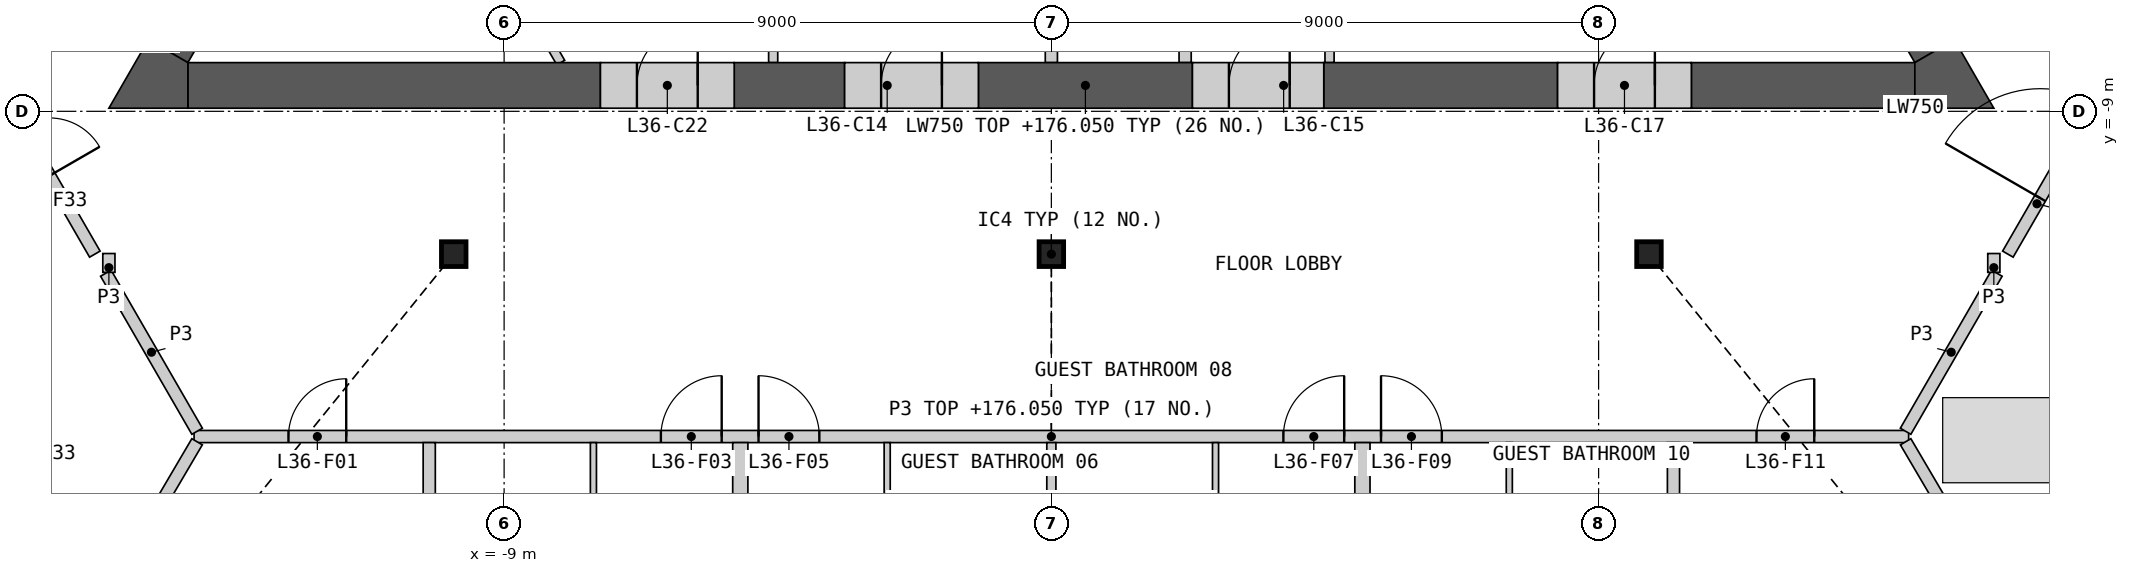
"""IFC4 building model, lengths in metres.
Left out: names, types, materials, properties, quantities, classifications, styles, units other than length and angle.
Written with IfcOpenShell. Run it as: python <this file> out.ifc"""

import sys

from ifc_helpers import new_model, si_unit, direction, frame, frame_2d, origin, origin_2d, place, context, subcontext, project, spatial, polyline, rectangle, i_section, outline, extrude, element, fill, save


model = new_model("IFC4")
c1 = context("Model", 3, precision=1e-05, world=origin(), true_north=direction((0.0, 1.0)))
c2 = subcontext(c1, "Body", "Model", "MODEL_VIEW")
j1 = project(units=[si_unit("LENGTHUNIT", "METRE"), si_unit("PLANEANGLEUNIT", "RADIAN")], contexts=[c1])
p1 = place(None, origin())
s1 = spatial("IfcSite", under=j1, at=p1, CompositionType="ELEMENT")
p2 = place(p1, origin())
s2 = spatial("IfcBuilding", under=s1, at=p2, CompositionType="ELEMENT")
p3 = place(p2, frame((0.0, 0.0, 172.8)))
s3 = spatial("IfcBuildingStorey", under=s2, at=p3, CompositionType="ELEMENT", Elevation=172.8)
for number, where, z_axis, x_axis in (
    (1, (-9.828, -11.349, 0.0), (0.0, 0.0, 1.0), (1.0, 0.0, 0.0)),
    (2, (0.0, -11.349, 0.0), (0.0, 0.0, 1.0), (1.0, 0.0, 0.0)),
    (3, (9.828, -11.349, 0.0), (0.0, 0.0, 1.0), (1.0, 0.0, 0.0)),
):
    element("IfcColumn", number, at=place(p3, frame(where, z_axis=z_axis, x_axis=x_axis)), inside=s3, PredefinedType="COLUMN", context=c2, shape_type="SweptSolid", body=[
        extrude(i_section(OverallWidth=0.404, OverallDepth=0.407, WebThickness=0.027, FlangeThickness=0.044, at=origin_2d()), origin(), (0.0, 0.0, 1.0), 3.6),
    ])
for number, where, z_axis, x_axis in (
    (4, (0.0, -6.906, 0.0), (0.0, 0.0, 1.0), (0.0, -1.0, 0.0)),
    (5, (2.2, -6.906, 0.0), (0.0, 0.0, 1.0), (0.0, -1.0, 0.0)),
):
    element("IfcWall", number, at=place(p3, frame(where, z_axis=z_axis, x_axis=x_axis)), inside=s3, PredefinedType="SHEAR", context=c2, shape_type="SweptSolid", body=[
        extrude(rectangle(XDim=1.293, YDim=0.2, at=frame_2d((0.646, 0.0))), origin(), (0.0, 0.0, 1.0), 3.25),
    ])
for number, where, z_axis, x_axis in (
    (6, (4.575, -6.906, 0.0), (0.0, 0.0, 1.0), (0.0, -1.0, 0.0)),
    (7, (-4.575, -6.906, 0.0), (0.0, 0.0, 1.0), (0.0, -1.0, 0.0)),
):
    element("IfcWall", number, at=place(p3, frame(where, z_axis=z_axis, x_axis=x_axis)), inside=s3, PredefinedType="PARTITIONING", context=c2, shape_type="SweptSolid", body=[
        extrude(rectangle(XDim=1.293, YDim=0.15, at=frame_2d((0.646, 0.0))), origin(), (0.0, 0.0, 1.0), 3.25),
    ])
p4 = place(p3, frame((-8.83, -6.881, 0.0), z_axis=(0.0, 0.0, 1.0), x_axis=(0.500037110984, -0.866003976688, 0.0)))
e8 = element("IfcWall", 8, at=p4, inside=s3, PredefinedType="PARTITIONING", context=c2, shape_type="SweptSolid", body=[
    extrude(rectangle(XDim=1.522, YDim=0.15, at=frame_2d((0.761, 0.0))), origin(), (0.0, 0.0, 1.0), 3.25),
])
p5 = place(p3, frame((-14.201, -8.574, 0.0), z_axis=(0.0, 0.0, 1.0), x_axis=(1.0, 0.0, 0.0)))
e9 = element("IfcWall", 9, at=p5, inside=s3, PredefinedType="SHEAR", context=c2, shape_type="SweptSolid", body=[
    extrude(rectangle(XDim=6.785, YDim=0.75, at=frame_2d((3.393, 0.0))), origin(), (0.0, 0.0, 1.0), 3.25),
])
p6 = place(p3, frame((4.48, -8.574, 0.0), z_axis=(0.0, 0.0, 1.0), x_axis=(1.0, 0.0, 0.0)))
e10 = element("IfcWall", 10, at=p6, inside=s3, PredefinedType="SHEAR", context=c2, shape_type="SweptSolid", body=[
    extrude(rectangle(XDim=3.845, YDim=0.75, at=frame_2d((1.923, 0.0))), origin(), (0.0, 0.0, 1.0), 3.25),
])
p7 = place(p3, frame((10.525, -8.574, 0.0), z_axis=(0.0, 0.0, 1.0), x_axis=(1.0, 0.0, 0.0)))
e11 = element("IfcWall", 11, at=p7, inside=s3, PredefinedType="SHEAR", context=c2, shape_type="SweptSolid", body=[
    extrude(rectangle(XDim=3.676, YDim=0.75, at=frame_2d((1.838, 0.0))), origin(), (0.0, 0.0, 1.0), 3.25),
])
p8 = place(p3, frame((-1.2, -8.574, 0.0), z_axis=(0.0, 0.0, 1.0), x_axis=(1.0, 0.0, 0.0)))
e12 = element("IfcWall", 12, at=p8, inside=s3, PredefinedType="SHEAR", context=c2, shape_type="SweptSolid", body=[
    extrude(rectangle(XDim=3.52, YDim=0.75, at=frame_2d((1.76, 0.0))), origin(), (0.0, 0.0, 1.0), 3.25),
])
p9 = place(p3, frame((-5.216, -8.574, 0.0), z_axis=(0.0, 0.0, 1.0), x_axis=(1.0, 0.0, 0.0)))
e13 = element("IfcWall", 13, at=p9, inside=s3, PredefinedType="SHEAR", context=c2, shape_type="SweptSolid", body=[
    extrude(rectangle(XDim=1.816, YDim=0.75, at=frame_2d((0.908, 0.0))), origin(), (0.0, 0.0, 1.0), 3.25),
])
p10 = place(p3, frame((14.526, -8.011, 0.0), z_axis=(0.0, 0.0, 1.0), x_axis=(-0.499994855372, 0.866028374016, 0.0)))
e14 = element("IfcWall", 14, at=p10, inside=s3, PredefinedType="SHEAR", context=c2, shape_type="SweptSolid", body=[
    extrude(rectangle(XDim=14.301, YDim=0.75, at=frame_2d((7.15, 0.0))), origin(), (0.0, 0.0, 1.0), 3.25),
])
p11 = place(p3, frame((-13.564, -6.346, 0.0), z_axis=(0.0, 0.0, 1.0), x_axis=(-0.499989888488, -0.86603124159, 0.0)))
e15 = element("IfcWall", 15, at=p11, inside=s3, PredefinedType="SHEAR", context=c2, shape_type="SweptSolid", body=[
    extrude(rectangle(XDim=1.923, YDim=0.75, at=frame_2d((0.961, 0.0))), origin(), (0.0, 0.0, 1.0), 3.25),
])
p12 = place(p3, origin())
e16 = element("IfcWall", 16, at=p12, inside=s3, PredefinedType="SHEAR", context=c2, shape_type="SweptSolid", body=[
    extrude(outline(polyline([(14.201, -8.949), (14.201, -8.199), (14.851, -7.824), (15.5, -8.949), (14.201, -8.949)])), origin(), (0.0, 0.0, 1.0), 3.25),
])
p13 = place(p3, origin())
e17 = element("IfcWall", 17, at=p13, inside=s3, PredefinedType="SHEAR", context=c2, shape_type="SweptSolid", body=[
    extrude(outline(polyline([(-14.851, -7.824), (-14.201, -8.199), (-14.201, -8.949), (-15.5, -8.949), (-14.851, -7.824)])), origin(), (0.0, 0.0, 1.0), 3.25),
])
p14 = place(p3, frame((-3.4, -8.574, 0.0), z_axis=(0.0, 0.0, 1.0), x_axis=(1.0, 0.0, 0.0)))
e18 = element("IfcWall", 18, at=p14, inside=s3, PredefinedType="SHEAR", context=c2, shape_type="SweptSolid", body=[
    extrude(rectangle(XDim=2.2, YDim=0.75, at=frame_2d((1.1, 0.0))), origin(), (0.0, 0.0, 1.0), 3.25),
])
p15 = place(p14, frame((0.6, 0.0, 0.0)))
e19 = element("IfcOpeningElement", 19, at=p15, cuts=e18, PredefinedType="OPENING", context=c2, shape_type="SweptSolid", body=[
    extrude(rectangle(XDim=1.0, YDim=2.1, at=frame_2d((0.5, 1.05))), frame((0.0, 0.385, 0.0), z_axis=(0.0, -1.0, 0.0), x_axis=(1.0, 0.0, 0.0)), (0.0, 0.0, 1.0), 0.77),
])
p16 = place(p3, frame((2.32, -8.574, 0.0), z_axis=(0.0, 0.0, 1.0), x_axis=(1.0, 0.0, 0.0)))
e20 = element("IfcWall", 20, at=p16, inside=s3, PredefinedType="SHEAR", context=c2, shape_type="SweptSolid", body=[
    extrude(rectangle(XDim=2.16, YDim=0.75, at=frame_2d((1.08, 0.0))), origin(), (0.0, 0.0, 1.0), 3.25),
])
p17 = place(p16, frame((0.6, 0.0, 0.0)))
e21 = element("IfcOpeningElement", 21, at=p17, cuts=e20, PredefinedType="OPENING", context=c2, shape_type="SweptSolid", body=[
    extrude(rectangle(XDim=1.0, YDim=2.1, at=frame_2d((0.5, 1.05))), frame((0.0, 0.385, 0.0), z_axis=(0.0, -1.0, 0.0), x_axis=(1.0, 0.0, 0.0)), (0.0, 0.0, 1.0), 0.77),
])
p18 = place(p3, frame((8.325, -8.574, 0.0), z_axis=(0.0, 0.0, 1.0), x_axis=(1.0, 0.0, 0.0)))
e22 = element("IfcWall", 22, at=p18, inside=s3, PredefinedType="SHEAR", context=c2, shape_type="SweptSolid", body=[
    extrude(rectangle(XDim=2.2, YDim=0.75, at=frame_2d((1.1, 0.0))), origin(), (0.0, 0.0, 1.0), 3.25),
])
p19 = place(p18, frame((0.6, 0.0, 0.0)))
e23 = element("IfcOpeningElement", 23, at=p19, cuts=e22, PredefinedType="OPENING", context=c2, shape_type="SweptSolid", body=[
    extrude(rectangle(XDim=1.0, YDim=2.1, at=frame_2d((0.5, 1.05))), frame((0.0, 0.385, 0.0), z_axis=(0.0, -1.0, 0.0), x_axis=(1.0, 0.0, 0.0)), (0.0, 0.0, 1.0), 0.77),
])
p20 = place(p3, frame((-7.416, -8.574, 0.0), z_axis=(0.0, 0.0, 1.0), x_axis=(1.0, 0.0, 0.0)))
e24 = element("IfcWall", 24, at=p20, inside=s3, PredefinedType="SHEAR", context=c2, shape_type="SweptSolid", body=[
    extrude(rectangle(XDim=2.2, YDim=0.75, at=frame_2d((1.1, 0.0))), origin(), (0.0, 0.0, 1.0), 3.25),
])
p21 = place(p20, frame((0.6, 0.0, 0.0)))
e25 = element("IfcOpeningElement", 25, at=p21, cuts=e24, PredefinedType="OPENING", context=c2, shape_type="SweptSolid", body=[
    extrude(rectangle(XDim=1.0, YDim=2.1, at=frame_2d((0.5, 1.05))), frame((0.0, 0.385, 0.0), z_axis=(0.0, -1.0, 0.0), x_axis=(1.0, 0.0, 0.0)), (0.0, 0.0, 1.0), 0.77),
])
p22 = place(p3, frame((-14.099, -14.349, 0.0), z_axis=(0.0, 0.0, 1.0), x_axis=(1.0, 0.0, 0.0)))
e26 = element("IfcWall", 26, at=p22, inside=s3, PredefinedType="PARTITIONING", context=c2, shape_type="SweptSolid", body=[
    extrude(rectangle(XDim=28.198, YDim=0.2, at=frame_2d((14.099, 0.0))), origin(), (0.0, 0.0, 1.0), 3.25),
])
p23 = place(p22, frame((1.552, 0.0, 0.0)))
e27 = element("IfcOpeningElement", 27, at=p23, cuts=e26, PredefinedType="OPENING", context=c2, shape_type="SweptSolid", body=[
    extrude(rectangle(XDim=0.95, YDim=2.1, at=frame_2d((0.475, 1.05))), frame((0.0, 0.11, 0.0), z_axis=(0.0, -1.0, 0.0), x_axis=(1.0, 0.0, 0.0)), (0.0, 0.0, 1.0), 0.22),
])
p24 = place(p22, frame((7.677, 0.0, 0.0)))
e28 = element("IfcOpeningElement", 28, at=p24, cuts=e26, PredefinedType="OPENING", context=c2, shape_type="SweptSolid", body=[
    extrude(rectangle(XDim=1.0, YDim=2.1, at=frame_2d((0.5, 1.05))), frame((0.0, 0.11, 0.0), z_axis=(0.0, -1.0, 0.0), x_axis=(1.0, 0.0, 0.0)), (0.0, 0.0, 1.0), 0.22),
])
p25 = place(p22, frame((9.283, 0.0, 0.0)))
e29 = element("IfcOpeningElement", 29, at=p25, cuts=e26, PredefinedType="OPENING", context=c2, shape_type="SweptSolid", body=[
    extrude(rectangle(XDim=1.0, YDim=2.1, at=frame_2d((0.5, 1.05))), frame((0.0, 0.11, 0.0), z_axis=(0.0, -1.0, 0.0), x_axis=(1.0, 0.0, 0.0)), (0.0, 0.0, 1.0), 0.22),
])
p26 = place(p22, frame((17.915, 0.0, 0.0)))
e30 = element("IfcOpeningElement", 30, at=p26, cuts=e26, PredefinedType="OPENING", context=c2, shape_type="SweptSolid", body=[
    extrude(rectangle(XDim=1.0, YDim=2.1, at=frame_2d((0.5, 1.05))), frame((0.0, 0.11, 0.0), z_axis=(0.0, -1.0, 0.0), x_axis=(1.0, 0.0, 0.0)), (0.0, 0.0, 1.0), 0.22),
])
p27 = place(p22, frame((19.521, 0.0, 0.0)))
e31 = element("IfcOpeningElement", 31, at=p27, cuts=e26, PredefinedType="OPENING", context=c2, shape_type="SweptSolid", body=[
    extrude(rectangle(XDim=1.0, YDim=2.1, at=frame_2d((0.5, 1.05))), frame((0.0, 0.11, 0.0), z_axis=(0.0, -1.0, 0.0), x_axis=(1.0, 0.0, 0.0)), (0.0, 0.0, 1.0), 0.22),
])
p28 = place(p22, frame((25.696, 0.0, 0.0)))
e32 = element("IfcOpeningElement", 32, at=p28, cuts=e26, PredefinedType="OPENING", context=c2, shape_type="SweptSolid", body=[
    extrude(rectangle(XDim=0.95, YDim=2.1, at=frame_2d((0.475, 1.05))), frame((0.0, 0.11, 0.0), z_axis=(0.0, -1.0, 0.0), x_axis=(1.0, 0.0, 0.0)), (0.0, 0.0, 1.0), 0.22),
])
p29 = place(p3, frame((-17.744, -8.035, 0.0), z_axis=(0.0, 0.0, 1.0), x_axis=(0.500007607708, 0.866021011428, 0.0)))
e33 = element("IfcWall", 33, at=p29, inside=s3, PredefinedType="PARTITIONING", context=c2, shape_type="SweptSolid", body=[
    extrude(rectangle(XDim=5.484, YDim=0.2, at=frame_2d((2.742, 0.0))), origin(), (0.0, 0.0, 1.0), 3.25),
])
p30 = place(p29, frame((0.352, 0.0, 0.0)))
e34 = element("IfcOpeningElement", 34, at=p30, cuts=e33, PredefinedType="OPENING", context=c2, shape_type="SweptSolid", body=[
    extrude(rectangle(XDim=1.1, YDim=2.1, at=frame_2d((0.55, 1.05))), frame((0.0, 0.11, 0.0), z_axis=(0.0, -1.0, 0.0), x_axis=(1.0, 0.0, 0.0)), (0.0, 0.0, 1.0), 0.22),
])
p31 = place(p3, frame((15.002, -3.286, 0.0), z_axis=(0.0, 0.0, 1.0), x_axis=(0.500007607708, -0.866021011428, 0.0)))
e35 = element("IfcWall", 35, at=p31, inside=s3, PredefinedType="PARTITIONING", context=c2, shape_type="SweptSolid", body=[
    extrude(rectangle(XDim=5.484, YDim=0.2, at=frame_2d((2.742, 0.0))), origin(), (0.0, 0.0, 1.0), 3.25),
])
p32 = place(p31, frame((4.032, 0.0, 0.0)))
e36 = element("IfcOpeningElement", 36, at=p32, cuts=e35, PredefinedType="OPENING", context=c2, shape_type="SweptSolid", body=[
    extrude(rectangle(XDim=1.1, YDim=2.1, at=frame_2d((0.55, 1.05))), frame((0.0, 0.11, 0.0), z_axis=(0.0, -1.0, 0.0), x_axis=(1.0, 0.0, 0.0)), (0.0, 0.0, 1.0), 0.22),
])
for number, where, z_axis, x_axis in (
    (37, (-5.116, -19.661, 0.0), (0.0, 0.0, 1.0), (0.0, 1.0, 0.0)),
    (38, (5.116, -19.661, 0.0), (0.0, 0.0, 1.0), (0.0, 1.0, 0.0)),
):
    element("IfcWall", number, at=place(p3, frame(where, z_axis=z_axis, x_axis=x_axis)), inside=s3, PredefinedType="PARTITIONING", context=c2, shape_type="SweptSolid", body=[
        extrude(rectangle(XDim=5.212, YDim=0.25, at=frame_2d((2.606, 0.0))), origin(), (0.0, 0.0, 1.0), 2.404),
    ])
p33 = place(p3, frame((15.731, -11.349, 0.0), z_axis=(0.0, 0.0, 1.0), x_axis=(0.499961815444, 0.866047448526, 0.0)))
e39 = element("IfcWall", 39, at=p33, inside=s3, PredefinedType="PARTITIONING", context=c2, shape_type="SweptSolid", body=[
    extrude(rectangle(XDim=3.826, YDim=0.2, at=frame_2d((1.913, 0.0))), origin(), (0.0, 0.0, 1.0), 3.25),
])
p34 = place(p33, frame((1.064, 0.0, 0.0)))
e40 = element("IfcOpeningElement", 40, at=p34, cuts=e39, PredefinedType="OPENING", context=c2, shape_type="SweptSolid", body=[
    extrude(rectangle(XDim=1.8, YDim=2.1, at=frame_2d((0.9, 1.05))), frame((0.0, 0.11, 0.0), z_axis=(0.0, -1.0, 0.0), x_axis=(1.0, 0.0, 0.0)), (0.0, 0.0, 1.0), 0.22),
])
p35 = place(p3, frame((-17.644, -8.035, 0.0), z_axis=(0.0, 0.0, 1.0), x_axis=(0.499961815444, -0.866047448526, 0.0)))
e41 = element("IfcWall", 41, at=p35, inside=s3, PredefinedType="PARTITIONING", context=c2, shape_type="SweptSolid", body=[
    extrude(rectangle(XDim=3.826, YDim=0.2, at=frame_2d((1.913, 0.0))), origin(), (0.0, 0.0, 1.0), 3.25),
])
p36 = place(p35, frame((1.386, 0.0, 0.0)))
e42 = element("IfcOpeningElement", 42, at=p36, cuts=e41, PredefinedType="OPENING", context=c2, shape_type="SweptSolid", body=[
    extrude(rectangle(XDim=0.95, YDim=2.1, at=frame_2d((0.475, 1.05))), frame((0.0, 0.11, 0.0), z_axis=(0.0, -1.0, 0.0), x_axis=(1.0, 0.0, 0.0)), (0.0, 0.0, 1.0), 0.22),
])
for number, where, z_axis, x_axis in (
    (43, (14.049, -14.262, 0.0), (0.0, 0.0, 1.0), (0.5, 0.866, 0.0)),
    (44, (-15.55, -11.662, 0.0), (0.0, 0.0, 1.0), (0.5, -0.866, 0.0)),
):
    element("IfcWall", number, at=place(p3, frame(where, z_axis=z_axis, x_axis=x_axis)), inside=s3, PredefinedType="PARTITIONING", context=c2, shape_type="SweptSolid", body=[
        extrude(rectangle(XDim=3.002, YDim=0.2, at=frame_2d((1.501, 0.0))), origin(), (0.0, 0.0, 1.0), 3.25),
    ])
for number, where, z_axis, x_axis in (
    (45, (15.5, -11.649, 0.0), (0.0, 0.0, 1.0), (0.0, 1.0, 0.0)),
    (46, (-15.5, -11.649, 0.0), (0.0, 0.0, 1.0), (0.0, 1.0, 0.0)),
):
    element("IfcWall", number, at=place(p3, frame(where, z_axis=z_axis, x_axis=x_axis)), inside=s3, PredefinedType="PARTITIONING", context=c2, shape_type="SweptSolid", body=[
        extrude(rectangle(XDim=0.31, YDim=0.2, at=frame_2d((0.155, 0.0))), origin(), (0.0, 0.0, 1.0), 3.25),
    ])
p37 = place(p3, frame((14.05, -14.435, 0.0), z_axis=(0.0, 0.0, 1.0), x_axis=(0.50691019554, -0.861998871031, 0.0)))
e47 = element("IfcWall", 47, at=p37, inside=s3, PredefinedType="PARTITIONING", context=c2, shape_type="SweptSolid", body=[
    extrude(rectangle(XDim=12.229, YDim=0.2, at=frame_2d((6.115, 0.0))), origin(), (0.0, 0.0, 1.0), 2.404),
])
p38 = place(p3, frame((-20.046, -24.632, 0.0), z_axis=(0.0, 0.0, 1.0), x_axis=(0.50691549935, 0.86199575203, 0.0)))
e48 = element("IfcWall", 48, at=p38, inside=s3, PredefinedType="PARTITIONING", context=c2, shape_type="SweptSolid", body=[
    extrude(rectangle(XDim=11.83, YDim=0.2, at=frame_2d((5.915, 0.0))), origin(), (0.0, 0.0, 1.0), 2.404),
])
p39 = place(p3, frame((-22.363, -7.862, 0.0), z_axis=(0.0, 0.0, 1.0), x_axis=(0.500009728207, -0.866019787128, 0.0)))
e49 = element("IfcWall", 49, at=p39, inside=s3, PredefinedType="PARTITIONING", context=c2, shape_type="SweptSolid", body=[
    extrude(rectangle(XDim=11.967, YDim=0.2, at=frame_2d((5.983, 0.0))), origin(), (0.0, 0.0, 1.0), 2.404),
])
p40 = place(p39, frame((5.658, 0.0, 0.0)))
e50 = element("IfcOpeningElement", 50, at=p40, cuts=e49, PredefinedType="OPENING", context=c2, shape_type="SweptSolid", body=[
    extrude(rectangle(XDim=0.95, YDim=2.1, at=frame_2d((0.475, 1.05))), frame((0.0, 0.11, 0.0), z_axis=(0.0, -1.0, 0.0), x_axis=(1.0, 0.0, 0.0)), (0.0, 0.0, 1.0), 0.22),
])
for number, where, z_axis, x_axis in (
    (51, (-10.231, -24.312, 0.0), (0.0, 0.0, 1.0), (0.0, 1.0, 0.0)),
    (52, (10.231, -24.312, 0.0), (0.0, 0.0, 1.0), (0.0, 1.0, 0.0)),
):
    element("IfcWall", number, at=place(p3, frame(where, z_axis=z_axis, x_axis=x_axis)), inside=s3, PredefinedType="PARTITIONING", context=c2, shape_type="SweptSolid", body=[
        extrude(rectangle(XDim=9.863, YDim=0.2, at=frame_2d((4.931, 0.0))), origin(), (0.0, 0.0, 1.0), 2.404),
    ])
p41 = place(p3, frame((0.0, -16.899, 0.0), z_axis=(0.0, 0.0, 1.0), x_axis=(0.0, 1.0, 0.0)))
e53 = element("IfcWall", 53, at=p41, inside=s3, PredefinedType="PLUMBINGWALL", context=c2, shape_type="SweptSolid", body=[
    extrude(rectangle(XDim=2.45, YDim=0.15, at=frame_2d((1.225, 0.0))), origin(), (0.0, 0.0, 1.0), 2.404),
])
for number, where, z_axis, x_axis in (
    (54, (-7.531, -16.899, 0.0), (0.0, 0.0, 1.0), (0.0, 1.0, 0.0)),
    (55, (-2.7, -16.899, 0.0), (0.0, 0.0, 1.0), (0.0, 1.0, 0.0)),
    (56, (2.7, -16.899, 0.0), (0.0, 0.0, 1.0), (0.0, 1.0, 0.0)),
    (57, (7.531, -16.899, 0.0), (0.0, 0.0, 1.0), (0.0, 1.0, 0.0)),
):
    element("IfcWall", number, at=place(p3, frame(where, z_axis=z_axis, x_axis=x_axis)), inside=s3, PredefinedType="PARTITIONING", context=c2, shape_type="SweptSolid", body=[
        extrude(rectangle(XDim=2.45, YDim=0.1, at=frame_2d((1.225, 0.0))), origin(), (0.0, 0.0, 1.0), 2.404),
    ])
p42 = place(p15, origin())
e58 = element("IfcDoor", 58, at=p42, inside=s3, OperationType="SINGLE_SWING_RIGHT", PredefinedType="DOOR", context=c2, shape_type="SweptSolid", body=[
    extrude(rectangle(XDim=1.0, YDim=2.1, at=frame_2d((0.5, 1.05))), frame((0.0, 0.13, 0.0), z_axis=(0.0, -1.0, 0.0), x_axis=(1.0, 0.0, 0.0)), (0.0, 0.0, 1.0), 0.05),
])
fill(e19, e58)
p43 = place(p17, origin())
e59 = element("IfcDoor", 59, at=p43, inside=s3, OperationType="SINGLE_SWING_RIGHT", PredefinedType="DOOR", context=c2, shape_type="SweptSolid", body=[
    extrude(rectangle(XDim=1.0, YDim=2.1, at=frame_2d((0.5, 1.05))), frame((0.0, 0.13, 0.0), z_axis=(0.0, -1.0, 0.0), x_axis=(1.0, 0.0, 0.0)), (0.0, 0.0, 1.0), 0.05),
])
fill(e21, e59)
p44 = place(p19, origin())
e60 = element("IfcDoor", 60, at=p44, inside=s3, OperationType="SINGLE_SWING_RIGHT", PredefinedType="DOOR", context=c2, shape_type="SweptSolid", body=[
    extrude(rectangle(XDim=1.0, YDim=2.1, at=frame_2d((0.5, 1.05))), frame((0.0, 0.13, 0.0), z_axis=(0.0, -1.0, 0.0), x_axis=(1.0, 0.0, 0.0)), (0.0, 0.0, 1.0), 0.05),
])
fill(e23, e60)
p45 = place(p21, origin())
e61 = element("IfcDoor", 61, at=p45, inside=s3, OperationType="SINGLE_SWING_RIGHT", PredefinedType="DOOR", context=c2, shape_type="SweptSolid", body=[
    extrude(rectangle(XDim=1.0, YDim=2.1, at=frame_2d((0.5, 1.05))), frame((0.0, 0.13, 0.0), z_axis=(0.0, -1.0, 0.0), x_axis=(1.0, 0.0, 0.0)), (0.0, 0.0, 1.0), 0.05),
])
fill(e25, e61)
p46 = place(p23, origin())
e62 = element("IfcDoor", 62, at=p46, inside=s3, OperationType="SINGLE_SWING_RIGHT", PredefinedType="DOOR", context=c2, shape_type="SweptSolid", body=[
    extrude(rectangle(XDim=0.95, YDim=2.1, at=frame_2d((0.475, 1.05))), frame((0.0, 0.025, 0.0), z_axis=(0.0, -1.0, 0.0), x_axis=(1.0, 0.0, 0.0)), (0.0, 0.0, 1.0), 0.05),
])
fill(e27, e62)
p47 = place(p24, origin())
e63 = element("IfcDoor", 63, at=p47, inside=s3, OperationType="SINGLE_SWING_RIGHT", PredefinedType="DOOR", context=c2, shape_type="SweptSolid", body=[
    extrude(rectangle(XDim=1.0, YDim=2.1, at=frame_2d((0.5, 1.05))), frame((0.0, 0.025, 0.0), z_axis=(0.0, -1.0, 0.0), x_axis=(1.0, 0.0, 0.0)), (0.0, 0.0, 1.0), 0.05),
])
fill(e28, e63)
p48 = place(p25, origin())
e64 = element("IfcDoor", 64, at=p48, inside=s3, OperationType="SINGLE_SWING_LEFT", PredefinedType="DOOR", context=c2, shape_type="SweptSolid", body=[
    extrude(rectangle(XDim=1.0, YDim=2.1, at=frame_2d((0.5, 1.05))), frame((0.0, 0.025, 0.0), z_axis=(0.0, -1.0, 0.0), x_axis=(1.0, 0.0, 0.0)), (0.0, 0.0, 1.0), 0.05),
])
fill(e29, e64)
p49 = place(p26, origin())
e65 = element("IfcDoor", 65, at=p49, inside=s3, OperationType="SINGLE_SWING_RIGHT", PredefinedType="DOOR", context=c2, shape_type="SweptSolid", body=[
    extrude(rectangle(XDim=1.0, YDim=2.1, at=frame_2d((0.5, 1.05))), frame((0.0, 0.025, 0.0), z_axis=(0.0, -1.0, 0.0), x_axis=(1.0, 0.0, 0.0)), (0.0, 0.0, 1.0), 0.05),
])
fill(e30, e65)
p50 = place(p27, origin())
e66 = element("IfcDoor", 66, at=p50, inside=s3, OperationType="SINGLE_SWING_LEFT", PredefinedType="DOOR", context=c2, shape_type="SweptSolid", body=[
    extrude(rectangle(XDim=1.0, YDim=2.1, at=frame_2d((0.5, 1.05))), frame((0.0, 0.025, 0.0), z_axis=(0.0, -1.0, 0.0), x_axis=(1.0, 0.0, 0.0)), (0.0, 0.0, 1.0), 0.05),
])
fill(e31, e66)
p51 = place(p28, origin())
e67 = element("IfcDoor", 67, at=p51, inside=s3, OperationType="SINGLE_SWING_RIGHT", PredefinedType="DOOR", context=c2, shape_type="SweptSolid", body=[
    extrude(rectangle(XDim=0.95, YDim=2.1, at=frame_2d((0.475, 1.05))), frame((0.0, 0.025, 0.0), z_axis=(0.0, -1.0, 0.0), x_axis=(1.0, 0.0, 0.0)), (0.0, 0.0, 1.0), 0.05),
])
fill(e32, e67)
p52 = place(p34, origin())
e68 = element("IfcDoor", 68, at=p52, inside=s3, OperationType="DOUBLE_DOOR_SINGLE_SWING", PredefinedType="DOOR", context=c2, shape_type="SweptSolid", body=[
    extrude(rectangle(XDim=1.8, YDim=2.1, at=frame_2d((0.9, 1.05))), frame((0.0, 0.025, 0.0), z_axis=(0.0, -1.0, 0.0), x_axis=(1.0, 0.0, 0.0)), (0.0, 0.0, 1.0), 0.05),
])
fill(e40, e68)
save(model, sys.argv[1])
